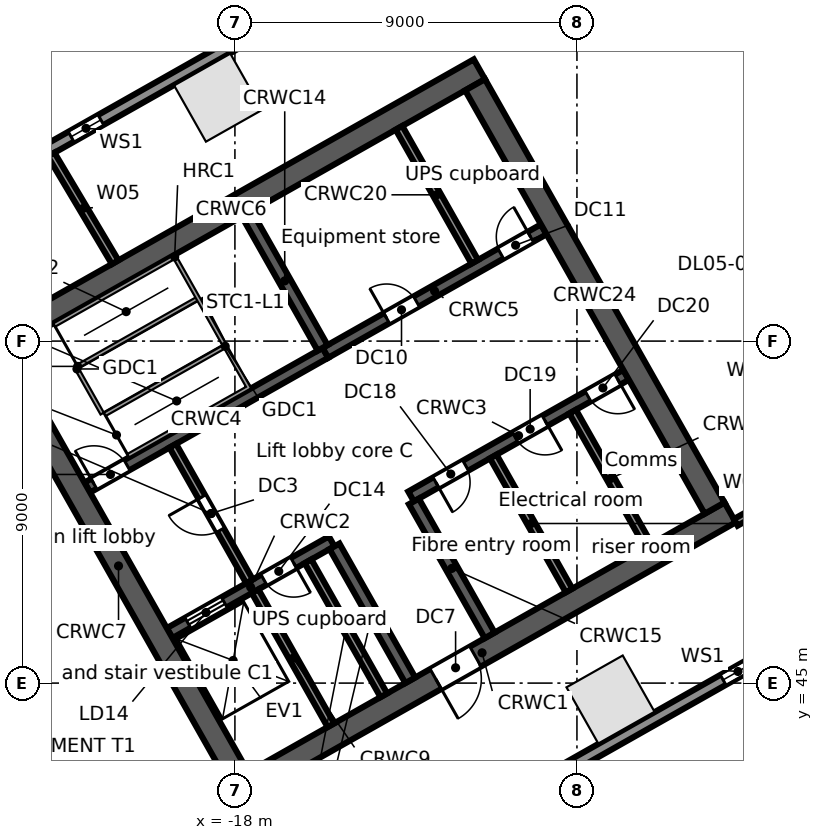
"""IFC4 building model, lengths in metres.
Left out: names, types, materials, properties, quantities, classifications, styles, units other than length and angle.
Written with IfcOpenShell. Run it as: python <this file> out.ifc"""

import sys

from ifc_helpers import new_model, si_unit, direction, frame, frame_2d, origin, origin_2d, place, context, subcontext, project, spatial, rectangle, extrude, element, fill, save


model = new_model("IFC4")
c1 = context("Model", 3, precision=1e-05, world=origin(), true_north=direction((0.0, 1.0)))
c2 = subcontext(c1, "Body", "Model", "MODEL_VIEW")
j1 = project(units=[si_unit("LENGTHUNIT", "METRE"), si_unit("PLANEANGLEUNIT", "RADIAN")], contexts=[c1])
p1 = place(None, origin())
s1 = spatial("IfcSite", under=j1, at=p1, CompositionType="ELEMENT")
p2 = place(p1, origin())
s2 = spatial("IfcBuilding", under=s1, at=p2, CompositionType="ELEMENT")
p3 = place(p2, frame((0.0, 0.0, 26.5)))
s3 = spatial("IfcBuildingStorey", under=s2, at=p3, CompositionType="ELEMENT", Elevation=26.5)
for number, where, z_axis, x_axis in (
    (1, (-18.441, 60.406, 0.0), (0.0, 0.0, 1.0), (-0.87, -0.492, 0.0)),
    (2, (-8.117, 44.568, 0.0), (0.0, 0.0, 1.0), (0.87, 0.492, 0.0)),
):
    element("IfcColumn", number, at=place(p3, frame(where, z_axis=z_axis, x_axis=x_axis)), inside=s3, PredefinedType="COLUMN", context=c2, shape_type="SweptSolid", body=[
        extrude(rectangle(XDim=1.7, YDim=1.7, at=origin_2d()), origin(), (0.0, 0.0, 1.0), 5.0),
    ])
p4 = place(p3, frame((-58.745, 38.764, 0.0), z_axis=(0.0, 0.0, 1.0), x_axis=(0.870355811726, 0.492423355453, 0.0)))
e3 = element("IfcWall", 3, at=p4, inside=s3, PredefinedType="STANDARD", context=c2, shape_type="SweptSolid", body=[
    extrude(rectangle(XDim=64.025, YDim=0.3, at=frame_2d((32.013, 0.0))), origin(), (0.0, 0.0, 1.0), 4.68),
])
p5 = place(p4, frame((60.122, 0.0, 0.6)))
e4 = element("IfcOpeningElement", 4, at=p5, cuts=e3, PredefinedType="OPENING", context=c2, shape_type="SweptSolid", body=[
    extrude(rectangle(XDim=0.9, YDim=3.2, at=frame_2d((0.45, 1.6))), frame((0.0, 0.16, 0.0), z_axis=(0.0, -1.0, 0.0), x_axis=(1.0, 0.0, 0.0)), (0.0, 0.0, 1.0), 0.32),
])
p6 = place(p4, frame((50.992, 0.0, 0.6)))
e5 = element("IfcOpeningElement", 5, at=p6, cuts=e3, PredefinedType="OPENING", context=c2, shape_type="SweptSolid", body=[
    extrude(rectangle(XDim=0.9, YDim=3.2, at=frame_2d((0.45, 1.6))), frame((0.0, 0.16, 0.0), z_axis=(0.0, -1.0, 0.0), x_axis=(1.0, 0.0, 0.0)), (0.0, 0.0, 1.0), 0.32),
])
p7 = place(p4, frame((41.862, 0.0, 0.6)))
e6 = element("IfcOpeningElement", 6, at=p7, cuts=e3, PredefinedType="OPENING", context=c2, shape_type="SweptSolid", body=[
    extrude(rectangle(XDim=0.9, YDim=3.2, at=frame_2d((0.45, 1.6))), frame((0.0, 0.16, 0.0), z_axis=(0.0, -1.0, 0.0), x_axis=(1.0, 0.0, 0.0)), (0.0, 0.0, 1.0), 0.32),
])
p8 = place(p4, frame((39.129, 0.0, 0.0)))
e7 = element("IfcOpeningElement", 7, at=p8, cuts=e3, PredefinedType="OPENING", context=c2, shape_type="SweptSolid", body=[
    extrude(rectangle(XDim=1.8, YDim=2.4, at=frame_2d((0.9, 1.2))), frame((0.0, 0.16, 0.0), z_axis=(0.0, -1.0, 0.0), x_axis=(1.0, 0.0, 0.0)), (0.0, 0.0, 1.0), 0.32),
])
p9 = place(p4, frame((32.732, 0.0, 0.6)))
e8 = element("IfcOpeningElement", 8, at=p9, cuts=e3, PredefinedType="OPENING", context=c2, shape_type="SweptSolid", body=[
    extrude(rectangle(XDim=0.9, YDim=3.2, at=frame_2d((0.45, 1.6))), frame((0.0, 0.16, 0.0), z_axis=(0.0, -1.0, 0.0), x_axis=(1.0, 0.0, 0.0)), (0.0, 0.0, 1.0), 0.32),
])
p10 = place(p4, frame((23.602, 0.0, 0.6)))
e9 = element("IfcOpeningElement", 9, at=p10, cuts=e3, PredefinedType="OPENING", context=c2, shape_type="SweptSolid", body=[
    extrude(rectangle(XDim=0.9, YDim=3.2, at=frame_2d((0.45, 1.6))), frame((0.0, 0.16, 0.0), z_axis=(0.0, -1.0, 0.0), x_axis=(1.0, 0.0, 0.0)), (0.0, 0.0, 1.0), 0.32),
])
p11 = place(p4, frame((20.87, 0.0, 0.0)))
e10 = element("IfcOpeningElement", 10, at=p11, cuts=e3, PredefinedType="OPENING", context=c2, shape_type="SweptSolid", body=[
    extrude(rectangle(XDim=1.8, YDim=2.4, at=frame_2d((0.9, 1.2))), frame((0.0, 0.16, 0.0), z_axis=(0.0, -1.0, 0.0), x_axis=(1.0, 0.0, 0.0)), (0.0, 0.0, 1.0), 0.32),
])
p12 = place(p4, frame((14.472, 0.0, 0.6)))
e11 = element("IfcOpeningElement", 11, at=p12, cuts=e3, PredefinedType="OPENING", context=c2, shape_type="SweptSolid", body=[
    extrude(rectangle(XDim=0.9, YDim=3.2, at=frame_2d((0.45, 1.6))), frame((0.0, 0.16, 0.0), z_axis=(0.0, -1.0, 0.0), x_axis=(1.0, 0.0, 0.0)), (0.0, 0.0, 1.0), 0.32),
])
p13 = place(p4, frame((5.342, 0.0, 0.6)))
e12 = element("IfcOpeningElement", 12, at=p13, cuts=e3, PredefinedType="OPENING", context=c2, shape_type="SweptSolid", body=[
    extrude(rectangle(XDim=0.9, YDim=3.2, at=frame_2d((0.45, 1.6))), frame((0.0, 0.16, 0.0), z_axis=(0.0, -1.0, 0.0), x_axis=(1.0, 0.0, 0.0)), (0.0, 0.0, 1.0), 0.32),
])
p14 = place(p3, frame((-0.055, 47.969, 0.0), z_axis=(0.0, 0.0, 1.0), x_axis=(-0.870355730478, -0.492423499058, 0.0)))
e13 = element("IfcWall", 13, at=p14, inside=s3, PredefinedType="STANDARD", context=c2, shape_type="SweptSolid", body=[
    extrude(rectangle(XDim=43.75, YDim=0.3, at=frame_2d((21.875, 0.0))), origin(), (0.0, 0.0, 1.0), 4.68),
])
p15 = place(p14, frame((39.977, 0.0, 0.6)))
e14 = element("IfcOpeningElement", 14, at=p15, cuts=e13, PredefinedType="OPENING", context=c2, shape_type="SweptSolid", body=[
    extrude(rectangle(XDim=0.9, YDim=3.2, at=frame_2d((0.45, 1.6))), frame((0.0, 0.16, 0.0), z_axis=(0.0, -1.0, 0.0), x_axis=(1.0, 0.0, 0.0)), (0.0, 0.0, 1.0), 0.32),
])
p16 = place(p14, frame((31.222, 0.0, 0.6)))
e15 = element("IfcOpeningElement", 15, at=p16, cuts=e13, PredefinedType="OPENING", context=c2, shape_type="SweptSolid", body=[
    extrude(rectangle(XDim=0.9, YDim=3.2, at=frame_2d((0.45, 1.6))), frame((0.0, 0.16, 0.0), z_axis=(0.0, -1.0, 0.0), x_axis=(1.0, 0.0, 0.0)), (0.0, 0.0, 1.0), 0.32),
])
p17 = place(p14, frame((28.584, 0.0, 0.0)))
e16 = element("IfcOpeningElement", 16, at=p17, cuts=e13, PredefinedType="OPENING", context=c2, shape_type="SweptSolid", body=[
    extrude(rectangle(XDim=1.8, YDim=2.4, at=frame_2d((0.9, 1.2))), frame((0.0, 0.16, 0.0), z_axis=(0.0, -1.0, 0.0), x_axis=(1.0, 0.0, 0.0)), (0.0, 0.0, 1.0), 0.32),
])
p18 = place(p14, frame((22.468, 0.0, 0.6)))
e17 = element("IfcOpeningElement", 17, at=p18, cuts=e13, PredefinedType="OPENING", context=c2, shape_type="SweptSolid", body=[
    extrude(rectangle(XDim=0.9, YDim=3.2, at=frame_2d((0.45, 1.6))), frame((0.0, 0.16, 0.0), z_axis=(0.0, -1.0, 0.0), x_axis=(1.0, 0.0, 0.0)), (0.0, 0.0, 1.0), 0.32),
])
p19 = place(p14, frame((13.713, 0.0, 0.6)))
e18 = element("IfcOpeningElement", 18, at=p19, cuts=e13, PredefinedType="OPENING", context=c2, shape_type="SweptSolid", body=[
    extrude(rectangle(XDim=0.9, YDim=3.2, at=frame_2d((0.45, 1.6))), frame((0.0, 0.16, 0.0), z_axis=(0.0, -1.0, 0.0), x_axis=(1.0, 0.0, 0.0)), (0.0, 0.0, 1.0), 0.32),
])
p20 = place(p14, frame((11.075, 0.0, 0.0)))
e19 = element("IfcOpeningElement", 19, at=p20, cuts=e13, PredefinedType="OPENING", context=c2, shape_type="SweptSolid", body=[
    extrude(rectangle(XDim=1.8, YDim=2.4, at=frame_2d((0.9, 1.2))), frame((0.0, 0.16, 0.0), z_axis=(0.0, -1.0, 0.0), x_axis=(1.0, 0.0, 0.0)), (0.0, 0.0, 1.0), 0.32),
])
p21 = place(p14, frame((4.959, 0.0, 0.6)))
e20 = element("IfcOpeningElement", 20, at=p21, cuts=e13, PredefinedType="OPENING", context=c2, shape_type="SweptSolid", body=[
    extrude(rectangle(XDim=0.9, YDim=3.2, at=frame_2d((0.45, 1.6))), frame((0.0, 0.16, 0.0), z_axis=(0.0, -1.0, 0.0), x_axis=(1.0, 0.0, 0.0)), (0.0, 0.0, 1.0), 0.32),
])
p22 = place(p3, frame((-18.024, 42.104, 0.0), z_axis=(0.0, 0.0, 1.0), x_axis=(0.870360574057, 0.492414937962, 0.0)))
e21 = element("IfcWall", 21, at=p22, inside=s3, PredefinedType="SOLIDWALL", context=c2, shape_type="SweptSolid", body=[
    extrude(rectangle(XDim=15.0, YDim=0.6, at=frame_2d((7.5, 0.0))), origin(), (0.0, 0.0, 1.0), 4.68),
])
p23 = place(p22, frame((6.1, 0.0, 0.0)))
e22 = element("IfcOpeningElement", 22, at=p23, cuts=e21, PredefinedType="OPENING", context=c2, shape_type="SweptSolid", body=[
    extrude(rectangle(XDim=1.2, YDim=2.1, at=frame_2d((0.6, 1.05))), frame((0.0, 0.31, 0.0), z_axis=(0.0, -1.0, 0.0), x_axis=(1.0, 0.0, 0.0)), (0.0, 0.0, 1.0), 0.62),
])
p24 = place(p3, frame((-19.718, 46.316, 0.0), z_axis=(0.0, 0.0, 1.0), x_axis=(0.870353963862, 0.492426621528, 0.0)))
e23 = element("IfcWall", 23, at=p24, inside=s3, PredefinedType="SOLIDWALL", context=c2, shape_type="SweptSolid", body=[
    extrude(rectangle(XDim=4.9, YDim=0.3, at=frame_2d((2.45, 0.0))), origin(), (0.0, 0.0, 1.0), 4.68),
])
p25 = place(p24, frame((0.55, 0.0, 0.0)))
e24 = element("IfcOpeningElement", 24, at=p25, cuts=e23, PredefinedType="OPENING", context=c2, shape_type="SweptSolid", body=[
    extrude(rectangle(XDim=1.1, YDim=2.1, at=frame_2d((0.55, 1.05))), frame((0.0, 0.16, 0.0), z_axis=(0.0, -1.0, 0.0), x_axis=(1.0, 0.0, 0.0)), (0.0, 0.0, 1.0), 0.32),
])
p26 = place(p24, frame((2.85, 0.0, 0.0)))
e25 = element("IfcOpeningElement", 25, at=p26, cuts=e23, PredefinedType="OPENING", context=c2, shape_type="SweptSolid", body=[
    extrude(rectangle(XDim=0.9, YDim=2.1, at=frame_2d((0.45, 1.05))), frame((0.0, 0.16, 0.0), z_axis=(0.0, -1.0, 0.0), x_axis=(1.0, 0.0, 0.0)), (0.0, 0.0, 1.0), 0.32),
])
p27 = place(p3, frame((-13.365, 49.911, 0.0), z_axis=(0.0, 0.0, 1.0), x_axis=(0.870340995471, 0.49244954219, 0.0)))
e26 = element("IfcWall", 26, at=p27, inside=s3, PredefinedType="SOLIDWALL", context=c2, shape_type="SweptSolid", body=[
    extrude(rectangle(XDim=6.5, YDim=0.3, at=frame_2d((3.25, 0.0))), origin(), (0.0, 0.0, 1.0), 4.68),
])
p28 = place(p27, frame((0.75, 0.0, 0.0)))
e27 = element("IfcOpeningElement", 27, at=p28, cuts=e26, PredefinedType="OPENING", context=c2, shape_type="SweptSolid", body=[
    extrude(rectangle(XDim=0.9, YDim=2.1, at=frame_2d((0.45, 1.05))), frame((0.0, 0.16, 0.0), z_axis=(0.0, -1.0, 0.0), x_axis=(1.0, 0.0, 0.0)), (0.0, 0.0, 1.0), 0.32),
])
p29 = place(p27, frame((3.15, 0.0, 0.0)))
e28 = element("IfcOpeningElement", 28, at=p29, cuts=e26, PredefinedType="OPENING", context=c2, shape_type="SweptSolid", body=[
    extrude(rectangle(XDim=0.9, YDim=2.1, at=frame_2d((0.45, 1.05))), frame((0.0, 0.16, 0.0), z_axis=(0.0, -1.0, 0.0), x_axis=(1.0, 0.0, 0.0)), (0.0, 0.0, 1.0), 0.32),
])
p30 = place(p27, frame((5.35, 0.0, 0.0)))
e29 = element("IfcOpeningElement", 29, at=p30, cuts=e26, PredefinedType="OPENING", context=c2, shape_type="SweptSolid", body=[
    extrude(rectangle(XDim=0.9, YDim=2.1, at=frame_2d((0.45, 1.05))), frame((0.0, 0.16, 0.0), z_axis=(0.0, -1.0, 0.0), x_axis=(1.0, 0.0, 0.0)), (0.0, 0.0, 1.0), 0.32),
])
p31 = place(p3, frame((-21.885, 50.146, 0.0), z_axis=(0.0, 0.0, 1.0), x_axis=(0.870359411463, 0.492416992881, 0.0)))
e30 = element("IfcWall", 30, at=p31, inside=s3, PredefinedType="SOLIDWALL", context=c2, shape_type="SweptSolid", body=[
    extrude(rectangle(XDim=7.2, YDim=0.3, at=frame_2d((3.6, 0.0))), origin(), (0.0, 0.0, 1.0), 4.68),
])
p32 = place(p31, frame((0.2, 0.0, 0.0)))
e31 = element("IfcOpeningElement", 31, at=p32, cuts=e30, PredefinedType="OPENING", context=c2, shape_type="SweptSolid", body=[
    extrude(rectangle(XDim=1.0, YDim=2.1, at=frame_2d((0.5, 1.05))), frame((0.0, 0.16, 0.0), z_axis=(0.0, -1.0, 0.0), x_axis=(1.0, 0.0, 0.0)), (0.0, 0.0, 1.0), 0.32),
])
p33 = place(p3, frame((-15.618, 53.691, 0.0), z_axis=(0.0, 0.0, 1.0), x_axis=(0.870356769198, 0.492421663121, 0.0)))
e32 = element("IfcWall", 32, at=p33, inside=s3, PredefinedType="SOLIDWALL", context=c2, shape_type="SweptSolid", body=[
    extrude(rectangle(XDim=6.6, YDim=0.3, at=frame_2d((3.3, 0.0))), origin(), (0.0, 0.0, 1.0), 4.68),
])
p34 = place(p33, frame((1.85, 0.0, 0.0)))
e33 = element("IfcOpeningElement", 33, at=p34, cuts=e32, PredefinedType="OPENING", context=c2, shape_type="SweptSolid", body=[
    extrude(rectangle(XDim=0.9, YDim=2.1, at=frame_2d((0.45, 1.05))), frame((0.0, 0.16, 0.0), z_axis=(0.0, -1.0, 0.0), x_axis=(1.0, 0.0, 0.0)), (0.0, 0.0, 1.0), 0.32),
])
p35 = place(p33, frame((5.3, 0.0, 0.0)))
e34 = element("IfcOpeningElement", 34, at=p35, cuts=e32, PredefinedType="OPENING", context=c2, shape_type="SweptSolid", body=[
    extrude(rectangle(XDim=0.9, YDim=2.1, at=frame_2d((0.45, 1.05))), frame((0.0, 0.16, 0.0), z_axis=(0.0, -1.0, 0.0), x_axis=(1.0, 0.0, 0.0)), (0.0, 0.0, 1.0), 0.32),
])
p36 = place(p3, frame((-24.623, 53.767, 0.0), z_axis=(0.0, 0.0, 1.0), x_axis=(0.870356627484, 0.492421913601, 0.0)))
e35 = element("IfcWall", 35, at=p36, inside=s3, PredefinedType="SOLIDWALL", context=c2, shape_type="SweptSolid", body=[
    extrude(rectangle(XDim=15.0, YDim=0.6, at=frame_2d((7.5, 0.0))), origin(), (0.0, 0.0, 1.0), 4.68),
])
p37 = place(p3, frame((-24.214, 53.654, 0.0), z_axis=(0.0, 0.0, 1.0), x_axis=(0.492441221355, -0.870345703448, 0.0)))
e36 = element("IfcWall", 36, at=p37, inside=s3, PredefinedType="SOLIDWALL", context=c2, shape_type="SweptSolid", body=[
    extrude(rectangle(XDim=12.8, YDim=0.6, at=frame_2d((6.4, 0.0))), origin(), (0.0, 0.0, 1.0), 4.68),
])
p38 = place(p3, frame((-17.469, 47.417, 0.0), z_axis=(0.0, 0.0, 1.0), x_axis=(0.492440575896, -0.870346068648, 0.0)))
e37 = element("IfcWall", 37, at=p38, inside=s3, PredefinedType="SOLIDWALL", context=c2, shape_type="SweptSolid", body=[
    extrude(rectangle(XDim=4.05, YDim=0.2, at=frame_2d((2.025, 0.0))), origin(), (0.0, 0.0, 1.0), 4.68),
])
p39 = place(p3, frame((-19.635, 51.246, 0.0), z_axis=(0.0, 0.0, 1.0), x_axis=(0.492408451753, -0.87036424366, 0.0)))
e38 = element("IfcWall", 38, at=p39, inside=s3, PredefinedType="PARTITIONING", context=c2, shape_type="SweptSolid", body=[
    extrude(rectangle(XDim=4.1, YDim=0.2, at=frame_2d((2.05, 0.0))), origin(), (0.0, 0.0, 1.0), 4.68),
])
p40 = place(p39, frame((1.55, 0.0, 0.0)))
e39 = element("IfcOpeningElement", 39, at=p40, cuts=e38, PredefinedType="OPENING", context=c2, shape_type="SweptSolid", body=[
    extrude(rectangle(XDim=1.0, YDim=2.1, at=frame_2d((0.5, 1.05))), frame((0.0, 0.11, 0.0), z_axis=(0.0, -1.0, 0.0), x_axis=(1.0, 0.0, 0.0)), (0.0, 0.0, 1.0), 0.22),
])
p41 = place(p3, frame((-16.076, 48.205, 0.0), z_axis=(0.0, 0.0, 1.0), x_axis=(0.492394910396, -0.870371904542, 0.0)))
e40 = element("IfcWall", 40, at=p41, inside=s3, PredefinedType="SOLIDWALL", context=c2, shape_type="SweptSolid", body=[
    extrude(rectangle(XDim=4.05, YDim=0.2, at=frame_2d((2.025, 0.0))), origin(), (0.0, 0.0, 1.0), 4.68),
])
p42 = place(p3, frame((-15.379, 48.599, 0.0), z_axis=(0.0, 0.0, 1.0), x_axis=(0.492394910396, -0.870371904542, 0.0)))
e41 = element("IfcWall", 41, at=p42, inside=s3, PredefinedType="SOLIDWALL", context=c2, shape_type="SweptSolid", body=[
    extrude(rectangle(XDim=4.05, YDim=0.3, at=frame_2d((2.025, 0.0))), origin(), (0.0, 0.0, 1.0), 4.68),
])
p43 = place(p3, frame((-17.686, 57.347, 0.0), z_axis=(0.0, 0.0, 1.0), x_axis=(0.492420746998, -0.870357287513, 0.0)))
e42 = element("IfcWall", 42, at=p43, inside=s3, PredefinedType="SOLIDWALL", context=c2, shape_type="SweptSolid", body=[
    extrude(rectangle(XDim=4.05, YDim=0.3, at=frame_2d((2.025, 0.0))), origin(), (0.0, 0.0, 1.0), 4.68),
])
p44 = place(p3, frame((-13.291, 49.781, 0.0), z_axis=(0.0, 0.0, 1.0), x_axis=(0.492394910396, -0.870371904542, 0.0)))
e43 = element("IfcWall", 43, at=p44, inside=s3, PredefinedType="SOLIDWALL", context=c2, shape_type="SweptSolid", body=[
    extrude(rectangle(XDim=4.05, YDim=0.3, at=frame_2d((2.025, 0.0))), origin(), (0.0, 0.0, 1.0), 4.68),
])
for number, where, z_axis, x_axis in (
    (44, (-11.202, 50.962, 0.0), (0.0, 0.0, 1.0), (0.492, -0.87, 0.0)),
    (45, (-13.683, 59.612, 0.0), (0.0, 0.0, 1.0), (0.492, -0.87, 0.0)),
):
    element("IfcWall", number, at=place(p3, frame(where, z_axis=z_axis, x_axis=x_axis)), inside=s3, PredefinedType="PARTITIONING", context=c2, shape_type="SweptSolid", body=[
        extrude(rectangle(XDim=4.05, YDim=0.2, at=frame_2d((2.025, 0.0))), origin(), (0.0, 0.0, 1.0), 4.68),
    ])
p45 = place(p3, frame((-9.113, 52.144, 0.0), z_axis=(0.0, 0.0, 1.0), x_axis=(0.492394910396, -0.870371904542, 0.0)))
e46 = element("IfcWall", 46, at=p45, inside=s3, PredefinedType="PARTITIONING", context=c2, shape_type="SweptSolid", body=[
    extrude(rectangle(XDim=4.05, YDim=0.2, at=frame_2d((2.025, 0.0))), origin(), (0.0, 0.0, 1.0), 4.68),
])
p46 = place(p3, frame((-11.681, 60.744, 0.0), z_axis=(0.0, 0.0, 1.0), x_axis=(0.492426772896, -0.870353878221, 0.0)))
e47 = element("IfcWall", 47, at=p46, inside=s3, PredefinedType="SOLIDWALL", context=c2, shape_type="SweptSolid", body=[
    extrude(rectangle(XDim=12.8, YDim=0.6, at=frame_2d((6.4, 0.0))), origin(), (0.0, 0.0, 1.0), 4.68),
])
p47 = place(p3, frame((-22.835, 58.908, 0.0), z_axis=(0.0, 0.0, 1.0), x_axis=(0.511113859879, -0.859513014584, 0.0)))
e48 = element("IfcWall", 48, at=p47, inside=s3, PredefinedType="PARTITIONING", context=c2, shape_type="SweptSolid", body=[
    extrude(rectangle(XDim=3.295, YDim=0.2, at=frame_2d((1.647, 0.0))), origin(), (0.0, 0.0, 1.0), 3.96),
])
p48 = place(p3, frame((-4.821, 49.23, 0.0), z_axis=(0.0, 0.0, 1.0), x_axis=(0.870371217631, 0.492396124598, 0.0)))
e49 = element("IfcWall", 49, at=p48, inside=s3, PredefinedType="PARTITIONING", context=c2, shape_type="SweptSolid", body=[
    extrude(rectangle(XDim=2.659, YDim=0.2, at=frame_2d((1.329, 0.0))), origin(), (0.0, 0.0, 1.0), 4.68),
])
p49 = place(p7, origin())
e50 = element("IfcWindow", 50, at=p49, inside=s3, PartitioningType="SINGLE_PANEL", PredefinedType="WINDOW", context=c2, shape_type="SweptSolid", body=[
    extrude(rectangle(XDim=0.9, YDim=3.2, at=frame_2d((0.45, 1.6))), frame((0.0, 0.03, 0.0), z_axis=(0.0, -1.0, 0.0), x_axis=(1.0, 0.0, 0.0)), (0.0, 0.0, 1.0), 0.06),
])
fill(e6, e50)
p50 = place(p21, origin())
e51 = element("IfcWindow", 51, at=p50, inside=s3, PartitioningType="SINGLE_PANEL", PredefinedType="WINDOW", context=c2, shape_type="SweptSolid", body=[
    extrude(rectangle(XDim=0.9, YDim=3.2, at=frame_2d((0.45, 1.6))), frame((0.0, 0.03, 0.0), z_axis=(0.0, -1.0, 0.0), x_axis=(1.0, 0.0, 0.0)), (0.0, 0.0, 1.0), 0.06),
])
fill(e20, e51)
p51 = place(p25, origin())
e52 = element("IfcDoor", 52, at=p51, inside=s3, OperationType="DOUBLE_DOOR_SLIDING", PredefinedType="DOOR", context=c2, shape_type="SweptSolid", body=[
    extrude(rectangle(XDim=1.1, YDim=2.1, at=frame_2d((0.55, 1.05))), frame((0.0, 0.025, 0.0), z_axis=(0.0, -1.0, 0.0), x_axis=(1.0, 0.0, 0.0)), (0.0, 0.0, 1.0), 0.05),
])
fill(e24, e52)
p52 = place(p32, origin())
e53 = element("IfcDoor", 53, at=p52, inside=s3, OperationType="SINGLE_SWING_LEFT", PredefinedType="DOOR", context=c2, shape_type="SweptSolid", body=[
    extrude(rectangle(XDim=1.0, YDim=2.1, at=frame_2d((0.5, 1.05))), frame((0.0, 0.025, 0.0), z_axis=(0.0, -1.0, 0.0), x_axis=(1.0, 0.0, 0.0)), (0.0, 0.0, 1.0), 0.05),
])
fill(e31, e53)
p53 = place(p40, frame((1.0, 0.0, 0.0), z_axis=(0.0, 0.0, 1.0), x_axis=(-1.0, 0.0, 0.0)))
e54 = element("IfcDoor", 54, at=p53, inside=s3, OperationType="SINGLE_SWING_RIGHT", PredefinedType="DOOR", context=c2, shape_type="SweptSolid", body=[
    extrude(rectangle(XDim=1.0, YDim=2.1, at=frame_2d((0.5, 1.05))), frame((0.0, 0.025, 0.0), z_axis=(0.0, -1.0, 0.0), x_axis=(1.0, 0.0, 0.0)), (0.0, 0.0, 1.0), 0.05),
])
fill(e39, e54)
p54 = place(p23, frame((1.2, 0.0, 0.0), z_axis=(0.0, 0.0, 1.0), x_axis=(-1.0, 0.0, 0.0)))
e55 = element("IfcDoor", 55, at=p54, inside=s3, OperationType="SINGLE_SWING_RIGHT", PredefinedType="DOOR", context=c2, shape_type="SweptSolid", body=[
    extrude(rectangle(XDim=1.2, YDim=2.1, at=frame_2d((0.6, 1.05))), frame((0.0, 0.025, 0.0), z_axis=(0.0, -1.0, 0.0), x_axis=(1.0, 0.0, 0.0)), (0.0, 0.0, 1.0), 0.05),
])
fill(e22, e55)
p55 = place(p34, origin())
e56 = element("IfcDoor", 56, at=p55, inside=s3, OperationType="SINGLE_SWING_LEFT", PredefinedType="DOOR", context=c2, shape_type="SweptSolid", body=[
    extrude(rectangle(XDim=0.9, YDim=2.1, at=frame_2d((0.45, 1.05))), frame((0.0, 0.025, 0.0), z_axis=(0.0, -1.0, 0.0), x_axis=(1.0, 0.0, 0.0)), (0.0, 0.0, 1.0), 0.05),
])
fill(e33, e56)
p56 = place(p35, origin())
e57 = element("IfcDoor", 57, at=p56, inside=s3, OperationType="SINGLE_SWING_RIGHT", PredefinedType="DOOR", context=c2, shape_type="SweptSolid", body=[
    extrude(rectangle(XDim=0.9, YDim=2.1, at=frame_2d((0.45, 1.05))), frame((0.0, 0.025, 0.0), z_axis=(0.0, -1.0, 0.0), x_axis=(1.0, 0.0, 0.0)), (0.0, 0.0, 1.0), 0.05),
])
fill(e34, e57)
p57 = place(p26, frame((0.9, 0.0, 0.0), z_axis=(0.0, 0.0, 1.0), x_axis=(-1.0, 0.0, 0.0)))
e58 = element("IfcDoor", 58, at=p57, inside=s3, OperationType="SINGLE_SWING_LEFT", PredefinedType="DOOR", context=c2, shape_type="SweptSolid", body=[
    extrude(rectangle(XDim=0.9, YDim=2.1, at=frame_2d((0.45, 1.05))), frame((0.0, 0.025, 0.0), z_axis=(0.0, -1.0, 0.0), x_axis=(1.0, 0.0, 0.0)), (0.0, 0.0, 1.0), 0.05),
])
fill(e25, e58)
p58 = place(p28, frame((0.9, 0.0, 0.0), z_axis=(0.0, 0.0, 1.0), x_axis=(-1.0, 0.0, 0.0)))
e59 = element("IfcDoor", 59, at=p58, inside=s3, OperationType="SINGLE_SWING_RIGHT", PredefinedType="DOOR", context=c2, shape_type="SweptSolid", body=[
    extrude(rectangle(XDim=0.9, YDim=2.1, at=frame_2d((0.45, 1.05))), frame((0.0, 0.025, 0.0), z_axis=(0.0, -1.0, 0.0), x_axis=(1.0, 0.0, 0.0)), (0.0, 0.0, 1.0), 0.05),
])
fill(e27, e59)
p59 = place(p29, frame((0.9, 0.0, 0.0), z_axis=(0.0, 0.0, 1.0), x_axis=(-1.0, 0.0, 0.0)))
e60 = element("IfcDoor", 60, at=p59, inside=s3, OperationType="SINGLE_SWING_LEFT", PredefinedType="DOOR", context=c2, shape_type="SweptSolid", body=[
    extrude(rectangle(XDim=0.9, YDim=2.1, at=frame_2d((0.45, 1.05))), frame((0.0, 0.025, 0.0), z_axis=(0.0, -1.0, 0.0), x_axis=(1.0, 0.0, 0.0)), (0.0, 0.0, 1.0), 0.05),
])
fill(e28, e60)
p60 = place(p30, frame((0.9, 0.0, 0.0), z_axis=(0.0, 0.0, 1.0), x_axis=(-1.0, 0.0, 0.0)))
e61 = element("IfcDoor", 61, at=p60, inside=s3, OperationType="SINGLE_SWING_LEFT", PredefinedType="DOOR", context=c2, shape_type="SweptSolid", body=[
    extrude(rectangle(XDim=0.9, YDim=2.1, at=frame_2d((0.45, 1.05))), frame((0.0, 0.025, 0.0), z_axis=(0.0, -1.0, 0.0), x_axis=(1.0, 0.0, 0.0)), (0.0, 0.0, 1.0), 0.05),
])
fill(e29, e61)
save(model, sys.argv[1])
